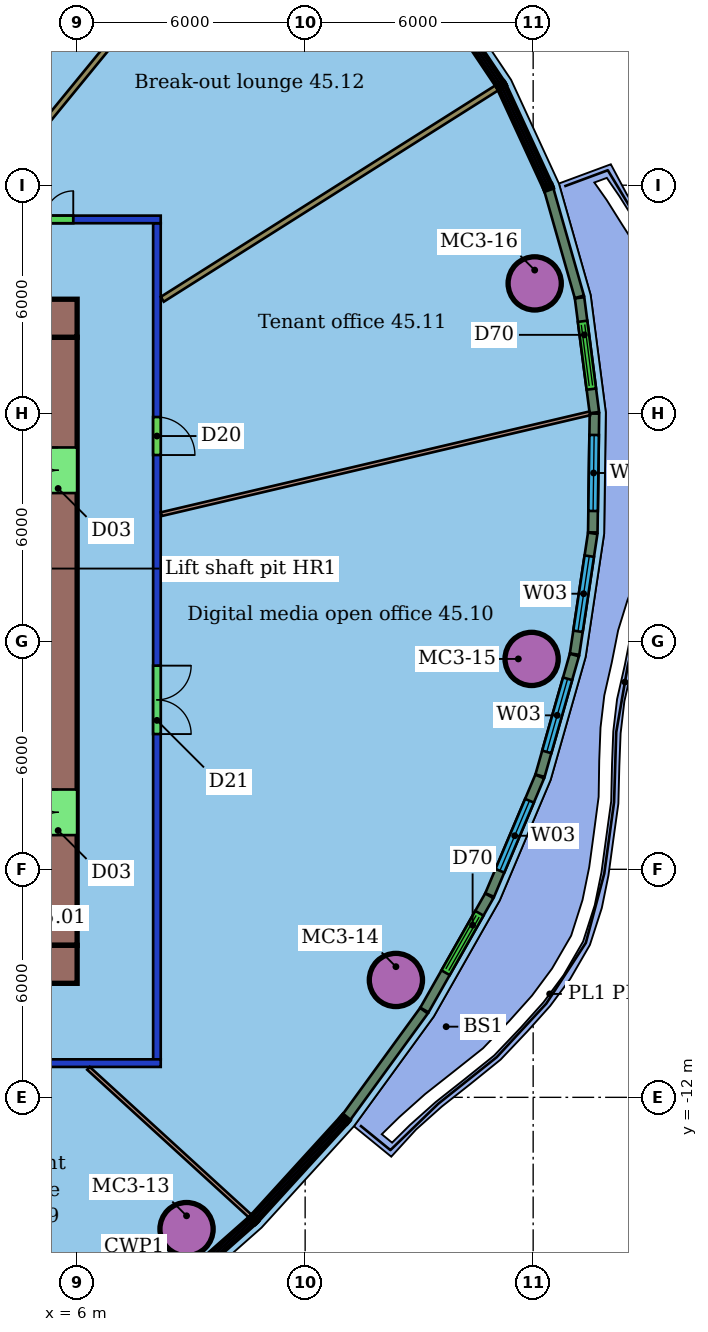
"""IFC4 building model, lengths in metres.
Left out: names, types, materials, properties, quantities, classifications, styles, units other than length and angle.
Written with IfcOpenShell. Run it as: python <this file> out.ifc"""

import sys

from ifc_helpers import new_model, si_unit, direction, frame, frame_2d, origin, origin_2d, place, context, subcontext, project, spatial, rectangle, hollow_circle, extrude, element, fill, save


model = new_model("IFC4")
c1 = context("Model", 3, precision=1e-05, world=origin(), true_north=direction((0.0, 1.0)))
c2 = subcontext(c1, "Body", "Model", "MODEL_VIEW")
j1 = project(units=[si_unit("LENGTHUNIT", "METRE"), si_unit("PLANEANGLEUNIT", "RADIAN")], contexts=[c1])
p1 = place(None, origin())
s1 = spatial("IfcSite", under=j1, at=p1, CompositionType="ELEMENT")
p2 = place(p1, origin())
s2 = spatial("IfcBuilding", under=s1, at=p2, CompositionType="ELEMENT")
p3 = place(p2, frame((0.0, 0.0, 186.6)))
s3 = spatial("IfcBuildingStorey", under=s2, at=p3, CompositionType="ELEMENT", Elevation=186.6)
for number, where, z_axis, x_axis in (
    (1, (8.879, -15.467, 0.0), (0.0, 0.0, 1.0), (1.0, 0.0, 0.0)),
    (2, (14.388, -8.912, 0.0), (0.0, 0.0, 1.0), (1.0, 0.0, 0.0)),
    (3, (17.959, -0.464, 0.0), (0.0, 0.0, 1.0), (1.0, 0.0, 0.0)),
    (4, (18.041, 9.417, 0.0), (0.0, 0.0, 1.0), (1.0, 0.0, 0.0)),
):
    element("IfcColumn", number, at=place(p3, frame(where, z_axis=z_axis, x_axis=x_axis)), inside=s3, PredefinedType="COLUMN", context=c2, shape_type="SweptSolid", body=[
        extrude(hollow_circle(Radius=0.7, WallThickness=0.05, at=origin_2d()), origin(), (0.0, 0.0, 1.0), 3.4),
    ])
p4 = place(p3, frame((8.2, -11.1, 0.0), z_axis=(0.0, 0.0, 1.0), x_axis=(-1.0, 0.0, 0.0)))
e5 = element("IfcWall", 5, at=p4, inside=s3, PredefinedType="PARTITIONING", context=c2, shape_type="SweptSolid", body=[
    extrude(rectangle(XDim=28.4, YDim=0.2, at=frame_2d((14.2, 0.0))), origin(), (0.0, 0.0, 1.0), 3.0),
])
p5 = place(p4, frame((22.019, 0.0, 0.0)))
e6 = element("IfcOpeningElement", 6, at=p5, cuts=e5, PredefinedType="OPENING", context=c2, shape_type="SweptSolid", body=[
    extrude(rectangle(XDim=1.8, YDim=2.1, at=frame_2d((0.9, 1.05))), frame((0.0, 0.11, 0.0), z_axis=(0.0, -1.0, 0.0), x_axis=(1.0, 0.0, 0.0)), (0.0, 0.0, 1.0), 0.22),
])
p6 = place(p4, frame((14.8, 0.0, 0.0)))
e7 = element("IfcOpeningElement", 7, at=p6, cuts=e5, PredefinedType="OPENING", context=c2, shape_type="SweptSolid", body=[
    extrude(rectangle(XDim=1.8, YDim=2.1, at=frame_2d((0.9, 1.05))), frame((0.0, 0.11, 0.0), z_axis=(0.0, -1.0, 0.0), x_axis=(1.0, 0.0, 0.0)), (0.0, 0.0, 1.0), 0.22),
])
p7 = place(p4, frame((5.278, 0.0, 0.0)))
e8 = element("IfcOpeningElement", 8, at=p7, cuts=e5, PredefinedType="OPENING", context=c2, shape_type="SweptSolid", body=[
    extrude(rectangle(XDim=1.0, YDim=2.1, at=frame_2d((0.5, 1.05))), frame((0.0, 0.11, 0.0), z_axis=(0.0, -1.0, 0.0), x_axis=(1.0, 0.0, 0.0)), (0.0, 0.0, 1.0), 0.22),
])
p8 = place(p3, frame((-20.2, 11.1, 0.0), z_axis=(0.0, 0.0, 1.0), x_axis=(1.0, 0.0, 0.0)))
e9 = element("IfcWall", 9, at=p8, inside=s3, PredefinedType="PARTITIONING", context=c2, shape_type="SweptSolid", body=[
    extrude(rectangle(XDim=28.4, YDim=0.2, at=frame_2d((14.2, 0.0))), origin(), (0.0, 0.0, 1.0), 3.0),
])
p9 = place(p8, frame((19.009, 0.0, 0.0)))
e10 = element("IfcOpeningElement", 10, at=p9, cuts=e9, PredefinedType="OPENING", context=c2, shape_type="SweptSolid", body=[
    extrude(rectangle(XDim=1.8, YDim=2.1, at=frame_2d((0.9, 1.05))), frame((0.0, 0.11, 0.0), z_axis=(0.0, -1.0, 0.0), x_axis=(1.0, 0.0, 0.0)), (0.0, 0.0, 1.0), 0.22),
])
p10 = place(p8, frame((9.356, 0.0, 0.0)))
e11 = element("IfcOpeningElement", 11, at=p10, cuts=e9, PredefinedType="OPENING", context=c2, shape_type="SweptSolid", body=[
    extrude(rectangle(XDim=1.5, YDim=2.1, at=frame_2d((0.75, 1.05))), frame((0.0, 0.11, 0.0), z_axis=(0.0, -1.0, 0.0), x_axis=(1.0, 0.0, 0.0)), (0.0, 0.0, 1.0), 0.22),
])
p11 = place(p8, frame((4.725, 0.0, 0.0)))
e12 = element("IfcOpeningElement", 12, at=p11, cuts=e9, PredefinedType="OPENING", context=c2, shape_type="SweptSolid", body=[
    extrude(rectangle(XDim=0.9, YDim=2.1, at=frame_2d((0.45, 1.05))), frame((0.0, 0.11, 0.0), z_axis=(0.0, -1.0, 0.0), x_axis=(1.0, 0.0, 0.0)), (0.0, 0.0, 1.0), 0.22),
])
p12 = place(p8, frame((24.598, 0.0, 0.0)))
e13 = element("IfcOpeningElement", 13, at=p12, cuts=e9, PredefinedType="OPENING", context=c2, shape_type="SweptSolid", body=[
    extrude(rectangle(XDim=1.5, YDim=2.1, at=frame_2d((0.75, 1.05))), frame((0.0, 0.11, 0.0), z_axis=(0.0, -1.0, 0.0), x_axis=(1.0, 0.0, 0.0)), (0.0, 0.0, 1.0), 0.22),
])
p13 = place(p3, frame((8.1, 11.0, 0.0), z_axis=(0.0, 0.0, 1.0), x_axis=(0.0, -1.0, 0.0)))
e14 = element("IfcWall", 14, at=p13, inside=s3, PredefinedType="PARTITIONING", context=c2, shape_type="SweptSolid", body=[
    extrude(rectangle(XDim=22.0, YDim=0.2, at=frame_2d((11.0, 0.0))), origin(), (0.0, 0.0, 1.0), 3.0),
])
p14 = place(p13, frame((11.641, 0.0, 0.0)))
e15 = element("IfcOpeningElement", 15, at=p14, cuts=e14, PredefinedType="OPENING", context=c2, shape_type="SweptSolid", body=[
    extrude(rectangle(XDim=1.8, YDim=2.1, at=frame_2d((0.9, 1.05))), frame((0.0, 0.11, 0.0), z_axis=(0.0, -1.0, 0.0), x_axis=(1.0, 0.0, 0.0)), (0.0, 0.0, 1.0), 0.22),
])
p15 = place(p13, frame((5.099, 0.0, 0.0)))
e16 = element("IfcOpeningElement", 16, at=p15, cuts=e14, PredefinedType="OPENING", context=c2, shape_type="SweptSolid", body=[
    extrude(rectangle(XDim=1.0, YDim=2.1, at=frame_2d((0.5, 1.05))), frame((0.0, 0.11, 0.0), z_axis=(0.0, -1.0, 0.0), x_axis=(1.0, 0.0, 0.0)), (0.0, 0.0, 1.0), 0.22),
])
p16 = place(p3, frame((11.127, 20.921, 0.0), z_axis=(0.0, 0.0, 1.0), x_axis=(-0.633457906247, -0.773777152036, 0.0)))
e17 = element("IfcWall", 17, at=p16, inside=s3, PredefinedType="PARTITIONING", context=c2, shape_type="SweptSolid", body=[
    extrude(rectangle(XDim=12.501, YDim=0.15, at=frame_2d((6.25, 0.0))), origin(), (0.0, 0.0, 1.0), 3.4),
])
p17 = place(p3, frame((10.555, -15.125, 0.0), z_axis=(0.0, 0.0, 1.0), x_axis=(-0.738257150839, 0.674519369058, 0.0)))
e18 = element("IfcWall", 18, at=p17, inside=s3, PredefinedType="PARTITIONING", context=c2, shape_type="SweptSolid", body=[
    extrude(rectangle(XDim=5.765, YDim=0.1, at=frame_2d((2.882, 0.0))), origin(), (0.0, 0.0, 1.0), 3.4),
])
p18 = place(p3, frame((19.488, 5.997, 0.0), z_axis=(0.0, 0.0, 1.0), x_axis=(-0.973420761361, -0.229024062824, 0.0)))
e19 = element("IfcWall", 19, at=p18, inside=s3, PredefinedType="PARTITIONING", context=c2, shape_type="SweptSolid", body=[
    extrude(rectangle(XDim=11.584, YDim=0.1, at=frame_2d((5.792, 0.0))), origin(), (0.0, 0.0, 1.0), 3.4),
])
p19 = place(p3, frame((17.049, 14.565, 0.0), z_axis=(0.0, 0.0, 1.0), x_axis=(-0.845361941964, -0.534193960167, 0.0)))
e20 = element("IfcWall", 20, at=p19, inside=s3, PredefinedType="PARTITIONING", context=c2, shape_type="SweptSolid", body=[
    extrude(rectangle(XDim=10.42, YDim=0.15, at=frame_2d((5.21, 0.0))), origin(), (0.0, 0.0, 1.0), 3.4),
])
p20 = place(p3, frame((13.084, -12.526, 0.0), z_axis=(0.0, 0.0, 1.0), x_axis=(0.588548101518, 0.808462202085, 0.0)))
e21 = element("IfcWall", 21, at=p20, inside=s3, PredefinedType="SOLIDWALL", context=c2, shape_type="SweptSolid", body=[
    extrude(rectangle(XDim=3.47, YDim=0.25, at=frame_2d((1.735, 0.0))), origin(), (0.0, 0.0, 1.0), 3.05),
])
p21 = place(p3, frame((15.138, -9.702, 0.0), z_axis=(0.0, 0.0, 1.0), x_axis=(0.493878356134, 0.869531005394, 0.0)))
e22 = element("IfcWall", 22, at=p21, inside=s3, PredefinedType="SOLIDWALL", context=c2, shape_type="SweptSolid", body=[
    extrude(rectangle(XDim=3.457, YDim=0.25, at=frame_2d((1.729, 0.0))), origin(), (0.0, 0.0, 1.0), 3.05),
])
p22 = place(p21, frame((1.128, 0.0, 0.0)))
e23 = element("IfcOpeningElement", 23, at=p22, cuts=e22, PredefinedType="OPENING", context=c2, shape_type="SweptSolid", body=[
    extrude(rectangle(XDim=1.8, YDim=2.4, at=frame_2d((0.9, 1.2))), frame((0.0, 0.135, 0.0), z_axis=(0.0, -1.0, 0.0), x_axis=(1.0, 0.0, 0.0)), (0.0, 0.0, 1.0), 0.27),
])
p23 = place(p3, frame((16.856, -6.676, 0.0), z_axis=(0.0, 0.0, 1.0), x_axis=(0.389133942351, 0.921181184627, 0.0)))
e24 = element("IfcWall", 24, at=p23, inside=s3, PredefinedType="SOLIDWALL", context=c2, shape_type="SweptSolid", body=[
    extrude(rectangle(XDim=3.384, YDim=0.25, at=frame_2d((1.692, 0.0))), origin(), (0.0, 0.0, 1.0), 3.05),
])
p24 = place(p23, frame((0.692, 0.0, 0.9)))
e25 = element("IfcOpeningElement", 25, at=p24, cuts=e24, PredefinedType="OPENING", context=c2, shape_type="SweptSolid", body=[
    extrude(rectangle(XDim=2.0, YDim=2.1, at=frame_2d((1.0, 1.05))), frame((0.0, 0.135, 0.0), z_axis=(0.0, -1.0, 0.0), x_axis=(1.0, 0.0, 0.0)), (0.0, 0.0, 1.0), 0.27),
])
p25 = place(p3, frame((18.18, -3.536, 0.0), z_axis=(0.0, 0.0, 1.0), x_axis=(0.273969029479, 0.961738514819, 0.0)))
e26 = element("IfcWall", 26, at=p25, inside=s3, PredefinedType="SOLIDWALL", context=c2, shape_type="SweptSolid", body=[
    extrude(rectangle(XDim=3.302, YDim=0.25, at=frame_2d((1.651, 0.0))), origin(), (0.0, 0.0, 1.0), 3.05),
])
p26 = place(p25, frame((0.651, 0.0, 0.9)))
e27 = element("IfcOpeningElement", 27, at=p26, cuts=e26, PredefinedType="OPENING", context=c2, shape_type="SweptSolid", body=[
    extrude(rectangle(XDim=2.0, YDim=2.1, at=frame_2d((1.0, 1.05))), frame((0.0, 0.135, 0.0), z_axis=(0.0, -1.0, 0.0), x_axis=(1.0, 0.0, 0.0)), (0.0, 0.0, 1.0), 0.27),
])
p27 = place(p3, frame((19.09, -0.338, 0.0), z_axis=(0.0, 0.0, 1.0), x_axis=(0.148522482612, 0.988909031286, 0.0)))
e28 = element("IfcWall", 28, at=p27, inside=s3, PredefinedType="SOLIDWALL", context=c2, shape_type="SweptSolid", body=[
    extrude(rectangle(XDim=3.214, YDim=0.25, at=frame_2d((1.607, 0.0))), origin(), (0.0, 0.0, 1.0), 3.05),
])
p28 = place(p27, frame((0.607, 0.0, 0.9)))
e29 = element("IfcOpeningElement", 29, at=p28, cuts=e28, PredefinedType="OPENING", context=c2, shape_type="SweptSolid", body=[
    extrude(rectangle(XDim=2.0, YDim=2.1, at=frame_2d((1.0, 1.05))), frame((0.0, 0.135, 0.0), z_axis=(0.0, -1.0, 0.0), x_axis=(1.0, 0.0, 0.0)), (0.0, 0.0, 1.0), 0.27),
])
p29 = place(p3, frame((19.569, 2.865, 0.0), z_axis=(0.0, 0.0, 1.0), x_axis=(0.013901648004, 0.999903367422, 0.0)))
e30 = element("IfcWall", 30, at=p29, inside=s3, PredefinedType="SOLIDWALL", context=c2, shape_type="SweptSolid", body=[
    extrude(rectangle(XDim=3.126, YDim=0.25, at=frame_2d((1.563, 0.0))), origin(), (0.0, 0.0, 1.0), 3.05),
])
p30 = place(p29, frame((0.563, 0.0, 0.9)))
e31 = element("IfcOpeningElement", 31, at=p30, cuts=e30, PredefinedType="OPENING", context=c2, shape_type="SweptSolid", body=[
    extrude(rectangle(XDim=2.0, YDim=2.1, at=frame_2d((1.0, 1.05))), frame((0.0, 0.135, 0.0), z_axis=(0.0, -1.0, 0.0), x_axis=(1.0, 0.0, 0.0)), (0.0, 0.0, 1.0), 0.27),
])
p31 = place(p3, frame((19.611, 6.017, 0.0), z_axis=(0.0, 0.0, 1.0), x_axis=(-0.128108697177, 0.991760133151, 0.0)))
e32 = element("IfcWall", 32, at=p31, inside=s3, PredefinedType="SOLIDWALL", context=c2, shape_type="SweptSolid", body=[
    extrude(rectangle(XDim=3.045, YDim=0.25, at=frame_2d((1.523, 0.0))), origin(), (0.0, 0.0, 1.0), 3.05),
])
p32 = place(p31, frame((0.623, 0.0, 0.0)))
e33 = element("IfcOpeningElement", 33, at=p32, cuts=e32, PredefinedType="OPENING", context=c2, shape_type="SweptSolid", body=[
    extrude(rectangle(XDim=1.8, YDim=2.4, at=frame_2d((0.9, 1.2))), frame((0.0, 0.135, 0.0), z_axis=(0.0, -1.0, 0.0), x_axis=(1.0, 0.0, 0.0)), (0.0, 0.0, 1.0), 0.27),
])
p33 = place(p3, frame((19.216, 9.063, 0.0), z_axis=(0.0, 0.0, 1.0), x_axis=(-0.273919515729, 0.96175261835, 0.0)))
e34 = element("IfcWall", 34, at=p33, inside=s3, PredefinedType="SOLIDWALL", context=c2, shape_type="SweptSolid", body=[
    extrude(rectangle(XDim=2.937, YDim=0.25, at=frame_2d((1.468, 0.0))), origin(), (0.0, 0.0, 1.0), 3.05),
])
p34 = place(p3, frame((6.0, 8.5, 0.0), z_axis=(0.0, 0.0, 1.0), x_axis=(-1.0, 0.0, 0.0)))
e35 = element("IfcWall", 35, at=p34, inside=s3, PredefinedType="SHEAR", context=c2, shape_type="SweptSolid", body=[
    extrude(rectangle(XDim=12.0, YDim=1.0, at=frame_2d((6.0, 0.0))), origin(), (0.0, 0.0, 1.0), 3.15),
])
p35 = place(p34, frame((5.6, 0.0, 0.0)))
e36 = element("IfcOpeningElement", 36, at=p35, cuts=e35, PredefinedType="OPENING", context=c2, shape_type="SweptSolid", body=[
    extrude(rectangle(XDim=1.2, YDim=2.1, at=frame_2d((0.6, 1.05))), frame((0.0, 0.51, 0.0), z_axis=(0.0, -1.0, 0.0), x_axis=(1.0, 0.0, 0.0)), (0.0, 0.0, 1.0), 1.02),
])
p36 = place(p3, frame((-18.0, -8.5, 0.0), z_axis=(0.0, 0.0, 1.0), x_axis=(1.0, 0.0, 0.0)))
e37 = element("IfcWall", 37, at=p36, inside=s3, PredefinedType="SHEAR", context=c2, shape_type="SweptSolid", body=[
    extrude(rectangle(XDim=24.0, YDim=1.0, at=frame_2d((12.0, 0.0))), origin(), (0.0, 0.0, 1.0), 3.15),
])
p37 = place(p36, frame((6.0, 0.0, 0.0)))
e38 = element("IfcOpeningElement", 38, at=p37, cuts=e37, PredefinedType="OPENING", context=c2, shape_type="SweptSolid", body=[
    extrude(rectangle(XDim=1.2, YDim=2.1, at=frame_2d((0.6, 1.05))), frame((0.0, 0.51, 0.0), z_axis=(0.0, -1.0, 0.0), x_axis=(1.0, 0.0, 0.0)), (0.0, 0.0, 1.0), 1.02),
])
p38 = place(p3, frame((5.5, -8.0, 0.0), z_axis=(0.0, 0.0, 1.0), x_axis=(0.0, 1.0, 0.0)))
e39 = element("IfcWall", 39, at=p38, inside=s3, PredefinedType="SHEAR", context=c2, shape_type="SweptSolid", body=[
    extrude(rectangle(XDim=16.0, YDim=1.0, at=frame_2d((8.0, 0.0))), origin(), (0.0, 0.0, 1.0), 3.15),
])
p39 = place(p38, frame((2.9, 0.0, 0.0)))
e40 = element("IfcOpeningElement", 40, at=p39, cuts=e39, PredefinedType="OPENING", context=c2, shape_type="SweptSolid", body=[
    extrude(rectangle(XDim=1.2, YDim=2.1, at=frame_2d((0.6, 1.05))), frame((0.0, 0.51, 0.0), z_axis=(0.0, -1.0, 0.0), x_axis=(1.0, 0.0, 0.0)), (0.0, 0.0, 1.0), 1.02),
])
p40 = place(p38, frame((11.9, 0.0, 0.0)))
e41 = element("IfcOpeningElement", 41, at=p40, cuts=e39, PredefinedType="OPENING", context=c2, shape_type="SweptSolid", body=[
    extrude(rectangle(XDim=1.2, YDim=2.1, at=frame_2d((0.6, 1.05))), frame((0.0, 0.51, 0.0), z_axis=(0.0, -1.0, 0.0), x_axis=(1.0, 0.0, 0.0)), (0.0, 0.0, 1.0), 1.02),
])
p41 = place(p14, origin())
e42 = element("IfcDoor", 42, at=p41, inside=s3, OperationType="DOUBLE_DOOR_SINGLE_SWING", PredefinedType="DOOR", context=c2, shape_type="SweptSolid", body=[
    extrude(rectangle(XDim=1.8, YDim=2.1, at=frame_2d((0.9, 1.05))), frame((0.0, 0.025, 0.0), z_axis=(0.0, -1.0, 0.0), x_axis=(1.0, 0.0, 0.0)), (0.0, 0.0, 1.0), 0.05),
])
fill(e15, e42)
p42 = place(p15, origin())
e43 = element("IfcDoor", 43, at=p42, inside=s3, OperationType="SINGLE_SWING_RIGHT", PredefinedType="DOOR", context=c2, shape_type="SweptSolid", body=[
    extrude(rectangle(XDim=1.0, YDim=2.1, at=frame_2d((0.5, 1.05))), frame((0.0, 0.025, 0.0), z_axis=(0.0, -1.0, 0.0), x_axis=(1.0, 0.0, 0.0)), (0.0, 0.0, 1.0), 0.05),
])
fill(e16, e43)
p43 = place(p12, origin())
e44 = element("IfcDoor", 44, at=p43, inside=s3, OperationType="DOUBLE_DOOR_SINGLE_SWING", PredefinedType="DOOR", context=c2, shape_type="SweptSolid", body=[
    extrude(rectangle(XDim=1.5, YDim=2.1, at=frame_2d((0.75, 1.05))), frame((0.0, 0.025, 0.0), z_axis=(0.0, -1.0, 0.0), x_axis=(1.0, 0.0, 0.0)), (0.0, 0.0, 1.0), 0.05),
])
fill(e13, e44)
p44 = place(p22, origin())
e45 = element("IfcDoor", 45, at=p44, inside=s3, OperationType="DOUBLE_DOOR_SLIDING", PredefinedType="DOOR", context=c2, shape_type="SweptSolid", body=[
    extrude(rectangle(XDim=1.8, YDim=2.4, at=frame_2d((0.9, 1.2))), frame((0.0, 0.025, 0.0), z_axis=(0.0, -1.0, 0.0), x_axis=(1.0, 0.0, 0.0)), (0.0, 0.0, 1.0), 0.05),
])
fill(e23, e45)
p45 = place(p24, origin())
e46 = element("IfcWindow", 46, at=p45, inside=s3, PartitioningType="SINGLE_PANEL", PredefinedType="WINDOW", context=c2, shape_type="SweptSolid", body=[
    extrude(rectangle(XDim=2.0, YDim=2.1, at=frame_2d((1.0, 1.05))), frame((0.0, 0.03, 0.0), z_axis=(0.0, -1.0, 0.0), x_axis=(1.0, 0.0, 0.0)), (0.0, 0.0, 1.0), 0.06),
])
fill(e25, e46)
p46 = place(p26, origin())
e47 = element("IfcWindow", 47, at=p46, inside=s3, PartitioningType="SINGLE_PANEL", PredefinedType="WINDOW", context=c2, shape_type="SweptSolid", body=[
    extrude(rectangle(XDim=2.0, YDim=2.1, at=frame_2d((1.0, 1.05))), frame((0.0, 0.03, 0.0), z_axis=(0.0, -1.0, 0.0), x_axis=(1.0, 0.0, 0.0)), (0.0, 0.0, 1.0), 0.06),
])
fill(e27, e47)
p47 = place(p28, origin())
e48 = element("IfcWindow", 48, at=p47, inside=s3, PartitioningType="SINGLE_PANEL", PredefinedType="WINDOW", context=c2, shape_type="SweptSolid", body=[
    extrude(rectangle(XDim=2.0, YDim=2.1, at=frame_2d((1.0, 1.05))), frame((0.0, 0.03, 0.0), z_axis=(0.0, -1.0, 0.0), x_axis=(1.0, 0.0, 0.0)), (0.0, 0.0, 1.0), 0.06),
])
fill(e29, e48)
p48 = place(p30, origin())
e49 = element("IfcWindow", 49, at=p48, inside=s3, PartitioningType="SINGLE_PANEL", PredefinedType="WINDOW", context=c2, shape_type="SweptSolid", body=[
    extrude(rectangle(XDim=2.0, YDim=2.1, at=frame_2d((1.0, 1.05))), frame((0.0, 0.03, 0.0), z_axis=(0.0, -1.0, 0.0), x_axis=(1.0, 0.0, 0.0)), (0.0, 0.0, 1.0), 0.06),
])
fill(e31, e49)
p49 = place(p32, origin())
e50 = element("IfcDoor", 50, at=p49, inside=s3, OperationType="DOUBLE_DOOR_SLIDING", PredefinedType="DOOR", context=c2, shape_type="SweptSolid", body=[
    extrude(rectangle(XDim=1.8, YDim=2.4, at=frame_2d((0.9, 1.2))), frame((0.0, 0.025, 0.0), z_axis=(0.0, -1.0, 0.0), x_axis=(1.0, 0.0, 0.0)), (0.0, 0.0, 1.0), 0.05),
])
fill(e33, e50)
p50 = place(p39, origin())
e51 = element("IfcDoor", 51, at=p50, inside=s3, OperationType="DOUBLE_DOOR_SINGLE_SWING", PredefinedType="NOTDEFINED", context=c2, shape_type="SweptSolid", body=[
    extrude(rectangle(XDim=1.2, YDim=2.1, at=frame_2d((0.6, 1.05))), frame((0.0, 0.025, 0.0), z_axis=(0.0, -1.0, 0.0), x_axis=(1.0, 0.0, 0.0)), (0.0, 0.0, 1.0), 0.05),
])
fill(e40, e51)
p51 = place(p40, origin())
e52 = element("IfcDoor", 52, at=p51, inside=s3, OperationType="DOUBLE_DOOR_SINGLE_SWING", PredefinedType="NOTDEFINED", context=c2, shape_type="SweptSolid", body=[
    extrude(rectangle(XDim=1.2, YDim=2.1, at=frame_2d((0.6, 1.05))), frame((0.0, 0.025, 0.0), z_axis=(0.0, -1.0, 0.0), x_axis=(1.0, 0.0, 0.0)), (0.0, 0.0, 1.0), 0.05),
])
fill(e41, e52)
save(model, sys.argv[1])
